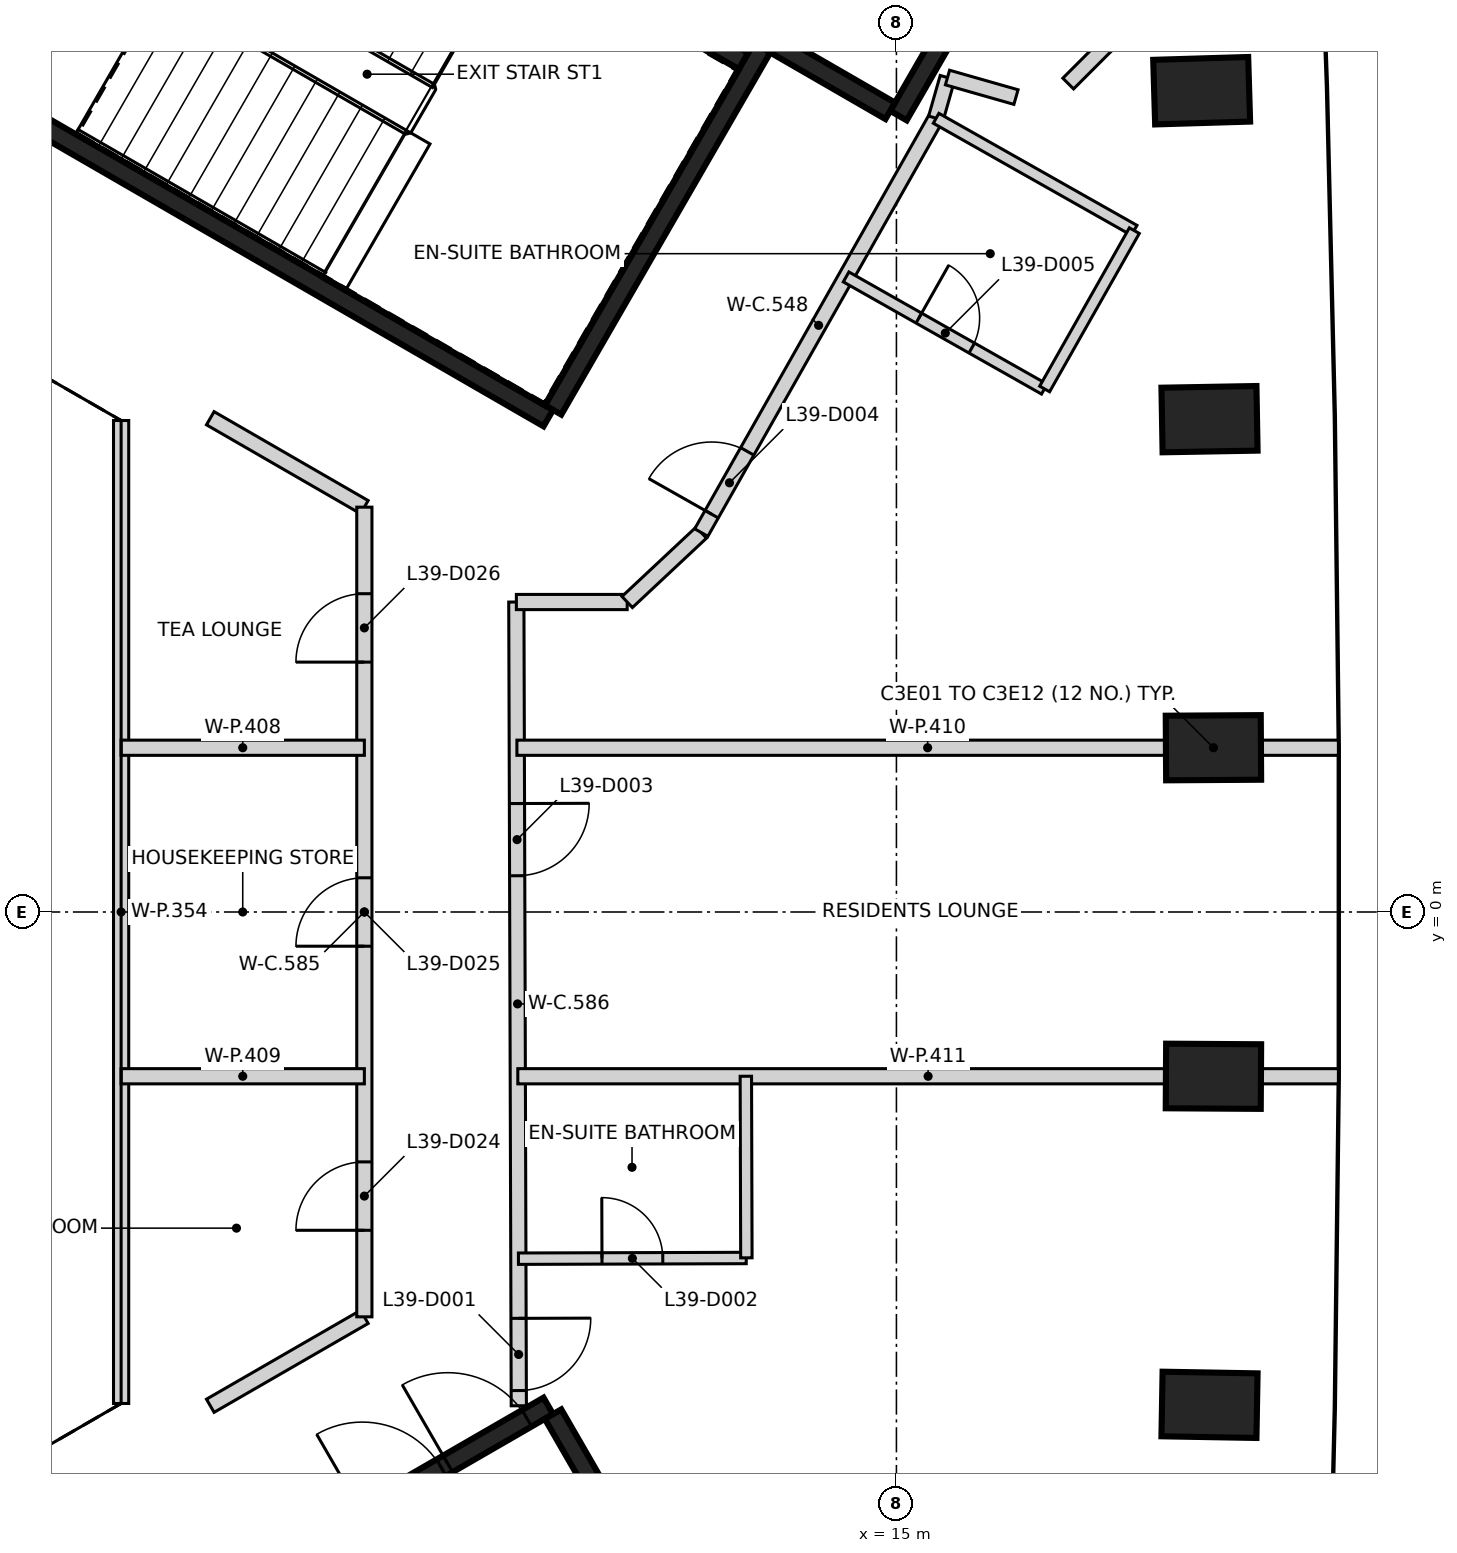
"""IFC4 building model, lengths in metres.
Left out: names, types, materials, properties, quantities, classifications, styles, units other than length and angle.
Written with IfcOpenShell. Run it as: python <this file> out.ifc"""

import sys

from ifc_helpers import new_model, si_unit, direction, frame, frame_2d, origin, origin_2d, place, context, subcontext, project, spatial, rectangle, extrude, element, fill, save


model = new_model("IFC4")
c1 = context("Model", 3, precision=1e-05, world=origin(), true_north=direction((0.0, 1.0)))
c2 = subcontext(c1, "Body", "Model", "MODEL_VIEW")
j1 = project(units=[si_unit("LENGTHUNIT", "METRE"), si_unit("PLANEANGLEUNIT", "RADIAN")], contexts=[c1])
p1 = place(None, origin())
s1 = spatial("IfcSite", under=j1, at=p1, CompositionType="ELEMENT")
p2 = place(p1, origin())
s2 = spatial("IfcBuilding", under=s1, at=p2, CompositionType="ELEMENT")
p3 = place(p2, frame((0.0, 0.0, 157.6)))
s3 = spatial("IfcBuildingStorey", under=s2, at=p3, CompositionType="ELEMENT", Elevation=157.6)
for number, where, z_axis, x_axis in (
    (1, (19.119, -6.484, -0.4), (0.0, 0.0, 1.0), (-1.0, 0.018, 0.0)),
    (2, (19.171, -2.161, -0.4), (0.0, 0.0, 1.0), (-1.0, 0.006, 0.0)),
    (3, (19.171, 2.161, -0.4), (0.0, 0.0, 1.0), (1.0, 0.006, 0.0)),
    (4, (19.119, 6.484, -0.4), (0.0, 0.0, 1.0), (1.0, 0.018, 0.0)),
    (5, (19.016, 10.805, -0.4), (0.0, 0.0, 1.0), (1.0, 0.03, 0.0)),
):
    element("IfcColumn", number, at=place(p3, frame(where, z_axis=z_axis, x_axis=x_axis)), inside=s3, PredefinedType="COLUMN", context=c2, shape_type="SweptSolid", body=[
        extrude(rectangle(XDim=1.25, YDim=0.85, at=origin_2d()), origin(), (0.0, 0.0, 1.0), 3.6),
    ])
p4 = place(p3, frame((10.42, 6.498, 0.0), z_axis=(0.0, 0.0, 1.0), x_axis=(-0.866021906294, 0.500006057782, 0.0)))
e6 = element("IfcWall", 6, at=p4, inside=s3, PredefinedType="SHEAR", context=c2, shape_type="SweptSolid", body=[
    extrude(rectangle(XDim=11.55, YDim=0.25, at=frame_2d((5.775, 0.0))), origin(), (0.0, 0.0, 1.0), 3.2),
])
p5 = place(p4, frame((10.025, 0.0, 0.0)))
e7 = element("IfcOpeningElement", 7, at=p5, cuts=e6, PredefinedType="OPENING", context=c2, shape_type="SweptSolid", body=[
    extrude(rectangle(XDim=1.2, YDim=2.1, at=frame_2d((0.6, 1.05))), frame((0.0, 0.135, 0.0), z_axis=(0.0, -1.0, 0.0), x_axis=(1.0, 0.0, 0.0)), (0.0, 0.0, 1.0), 0.27),
])
p6 = place(p4, frame((8.725, 0.0, 0.0)))
e8 = element("IfcOpeningElement", 8, at=p6, cuts=e6, PredefinedType="OPENING", context=c2, shape_type="SweptSolid", body=[
    extrude(rectangle(XDim=1.2, YDim=2.1, at=frame_2d((0.6, 1.05))), frame((0.0, 0.135, 0.0), z_axis=(0.0, -1.0, 0.0), x_axis=(1.0, 0.0, 0.0)), (0.0, 0.0, 1.0), 0.27),
])
p7 = place(p3, frame((13.238, 11.378, 0.0), z_axis=(0.0, 0.0, 1.0), x_axis=(-0.500008851346, -0.866020293397, 0.0)))
e9 = element("IfcWall", 9, at=p7, inside=s3, PredefinedType="SHEAR", context=c2, shape_type="SweptSolid", body=[
    extrude(rectangle(XDim=5.51, YDim=0.25, at=frame_2d((2.755, 0.0))), origin(), (0.0, 0.0, 1.0), 3.2),
])
p8 = place(p3, frame((16.552, 13.119, 0.0), z_axis=(0.0, 0.0, 1.0), x_axis=(-0.499978833458, -0.866037623948, 0.0)))
e10 = element("IfcWall", 10, at=p8, inside=s3, PredefinedType="SHEAR", context=c2, shape_type="SweptSolid", body=[
    extrude(rectangle(XDim=3.05, YDim=0.25, at=frame_2d((1.525, 0.0))), origin(), (0.0, 0.0, 1.0), 3.2),
])
p9 = place(p3, frame((14.918, 10.54, 0.0), z_axis=(0.0, 0.0, 1.0), x_axis=(-0.866063538972, 0.499933942099, 0.0)))
e11 = element("IfcWall", 11, at=p9, inside=s3, PredefinedType="SHEAR", context=c2, shape_type="SweptSolid", body=[
    extrude(rectangle(XDim=2.865, YDim=0.25, at=frame_2d((1.432, 0.0))), origin(), (0.0, 0.0, 1.0), 3.2),
])
p10 = place(p3, frame((10.865, 12.418, 0.0), z_axis=(0.0, 0.0, 1.0), x_axis=(0.866026229868, -0.499998569178, 0.0)))
e12 = element("IfcWall", 12, at=p10, inside=s3, PredefinedType="SHEAR", context=c2, shape_type="SweptSolid", body=[
    extrude(rectangle(XDim=2.449, YDim=0.25, at=frame_2d((1.225, 0.0))), origin(), (0.0, 0.0, 1.0), 3.2),
])
p11 = place(p3, frame((3.057, 10.895, 0.0), z_axis=(0.0, 0.0, 1.0), x_axis=(0.499989418164, 0.866031513124, 0.0)))
e13 = element("IfcWall", 13, at=p11, inside=s3, PredefinedType="SHEAR", context=c2, shape_type="SweptSolid", body=[
    extrude(rectangle(XDim=5.251, YDim=0.2, at=frame_2d((2.625, 0.0))), origin(), (0.0, 0.0, 1.0), 3.2),
])
p12 = place(p11, frame((1.849, 0.0, 0.0)))
e14 = element("IfcOpeningElement", 14, at=p12, cuts=e13, PredefinedType="OPENING", context=c2, shape_type="SweptSolid", body=[
    extrude(rectangle(XDim=1.4, YDim=2.1, at=frame_2d((0.7, 1.05))), frame((0.0, 0.11, 0.0), z_axis=(0.0, -1.0, 0.0), x_axis=(1.0, 0.0, 0.0)), (0.0, 0.0, 1.0), 0.22),
])
p13 = place(p3, frame((0.417, -12.273, 0.0), z_axis=(0.0, 0.0, 1.0), x_axis=(0.866021906294, 0.500006057782, 0.0)))
e15 = element("IfcWall", 15, at=p13, inside=s3, PredefinedType="SHEAR", context=c2, shape_type="SweptSolid", body=[
    extrude(rectangle(XDim=11.55, YDim=0.25, at=frame_2d((5.775, 0.0))), origin(), (0.0, 0.0, 1.0), 3.2),
])
p14 = place(p13, frame((10.025, 0.0, 0.0)))
e16 = element("IfcOpeningElement", 16, at=p14, cuts=e15, PredefinedType="OPENING", context=c2, shape_type="SweptSolid", body=[
    extrude(rectangle(XDim=1.2, YDim=2.1, at=frame_2d((0.6, 1.05))), frame((0.0, 0.135, 0.0), z_axis=(0.0, -1.0, 0.0), x_axis=(1.0, 0.0, 0.0)), (0.0, 0.0, 1.0), 0.27),
])
p15 = place(p13, frame((8.725, 0.0, 0.0)))
e17 = element("IfcOpeningElement", 17, at=p15, cuts=e15, PredefinedType="OPENING", context=c2, shape_type="SweptSolid", body=[
    extrude(rectangle(XDim=1.2, YDim=2.1, at=frame_2d((0.6, 1.05))), frame((0.0, 0.135, 0.0), z_axis=(0.0, -1.0, 0.0), x_axis=(1.0, 0.0, 0.0)), (0.0, 0.0, 1.0), 0.27),
])
p16 = place(p3, frame((10.483, -6.606, 0.0), z_axis=(0.0, 0.0, 1.0), x_axis=(0.49999885962, -0.866026062182, 0.0)))
e18 = element("IfcWall", 18, at=p16, inside=s3, PredefinedType="SHEAR", context=c2, shape_type="SweptSolid", body=[
    extrude(rectangle(XDim=5.225, YDim=0.25, at=frame_2d((2.612, 0.0))), origin(), (0.0, 0.0, 1.0), 3.2),
])
for number, where, z_axis, x_axis in (
    (19, (5.973, -6.496, 0.0), (0.0, 0.0, 1.0), (0.866, 0.5, 0.0)),
    (20, (5.973, 6.496, 0.0), (0.0, 0.0, 1.0), (0.866, -0.5, 0.0)),
):
    element("IfcWall", number, at=place(p3, frame(where, z_axis=z_axis, x_axis=x_axis)), inside=s3, PredefinedType="PARTITIONING", context=c2, shape_type="SweptSolid", body=[
        extrude(rectangle(XDim=2.341, YDim=0.2, at=frame_2d((1.17, 0.0))), origin(), (0.0, 0.0, 1.0), 3.2),
    ])
p17 = place(p3, frame((8.0, -5.326, 0.0), z_axis=(0.0, 0.0, 1.0), x_axis=(0.0, 1.0, 0.0)))
e21 = element("IfcWall", 21, at=p17, inside=s3, PredefinedType="PARTITIONING", context=c2, shape_type="SweptSolid", body=[
    extrude(rectangle(XDim=10.652, YDim=0.2, at=frame_2d((5.326, 0.0))), origin(), (0.0, 0.0, 1.0), 3.2),
])
p18 = place(p17, frame((1.138, 0.0, 0.0)))
e22 = element("IfcOpeningElement", 22, at=p18, cuts=e21, PredefinedType="OPENING", context=c2, shape_type="SweptSolid", body=[
    extrude(rectangle(XDim=0.9, YDim=2.1, at=frame_2d((0.45, 1.05))), frame((0.0, 0.11, 0.0), z_axis=(0.0, -1.0, 0.0), x_axis=(1.0, 0.0, 0.0)), (0.0, 0.0, 1.0), 0.22),
])
p19 = place(p17, frame((4.876, 0.0, 0.0)))
e23 = element("IfcOpeningElement", 23, at=p19, cuts=e21, PredefinedType="OPENING", context=c2, shape_type="SweptSolid", body=[
    extrude(rectangle(XDim=0.9, YDim=2.1, at=frame_2d((0.45, 1.05))), frame((0.0, 0.11, 0.0), z_axis=(0.0, -1.0, 0.0), x_axis=(1.0, 0.0, 0.0)), (0.0, 0.0, 1.0), 0.22),
])
p20 = place(p17, frame((8.614, 0.0, 0.0)))
e24 = element("IfcOpeningElement", 24, at=p20, cuts=e21, PredefinedType="OPENING", context=c2, shape_type="SweptSolid", body=[
    extrude(rectangle(XDim=0.9, YDim=2.1, at=frame_2d((0.45, 1.05))), frame((0.0, 0.11, 0.0), z_axis=(0.0, -1.0, 0.0), x_axis=(1.0, 0.0, 0.0)), (0.0, 0.0, 1.0), 0.22),
])
p21 = place(p3, frame((10.0, 4.078, 0.0), z_axis=(0.0, 0.0, 1.0), x_axis=(0.003070798941, -0.999995285086, 0.0)))
e25 = element("IfcWall", 25, at=p21, inside=s3, PredefinedType="PARTITIONING", context=c2, shape_type="SweptSolid", body=[
    extrude(rectangle(XDim=10.574, YDim=0.2, at=frame_2d((5.287, 0.0))), origin(), (0.0, 0.0, 1.0), 3.2),
])
p22 = place(p21, frame((9.424, 0.0, 0.0)))
e26 = element("IfcOpeningElement", 26, at=p22, cuts=e25, PredefinedType="OPENING", context=c2, shape_type="SweptSolid", body=[
    extrude(rectangle(XDim=0.95, YDim=2.1, at=frame_2d((0.475, 1.05))), frame((0.0, 0.11, 0.0), z_axis=(0.0, -1.0, 0.0), x_axis=(1.0, 0.0, 0.0)), (0.0, 0.0, 1.0), 0.22),
])
p23 = place(p21, frame((2.651, 0.0, 0.0)))
e27 = element("IfcOpeningElement", 27, at=p23, cuts=e25, PredefinedType="OPENING", context=c2, shape_type="SweptSolid", body=[
    extrude(rectangle(XDim=0.95, YDim=2.1, at=frame_2d((0.475, 1.05))), frame((0.0, 0.11, 0.0), z_axis=(0.0, -1.0, 0.0), x_axis=(1.0, 0.0, 0.0)), (0.0, 0.0, 1.0), 0.22),
])
p24 = place(p3, frame((10.0, 4.078, 0.0), z_axis=(0.0, 0.0, 1.0), x_axis=(1.0, 0.0, 0.0)))
e28 = element("IfcWall", 28, at=p24, inside=s3, PredefinedType="PARTITIONING", context=c2, shape_type="SweptSolid", body=[
    extrude(rectangle(XDim=1.458, YDim=0.2, at=frame_2d((0.729, 0.0))), origin(), (0.0, 0.0, 1.0), 3.2),
])
p25 = place(p3, frame((11.458, 4.078, 0.0), z_axis=(0.0, 0.0, 1.0), x_axis=(0.729936032318, 0.683515463412, 0.0)))
e29 = element("IfcWall", 29, at=p25, inside=s3, PredefinedType="PARTITIONING", context=c2, shape_type="SweptSolid", body=[
    extrude(rectangle(XDim=1.336, YDim=0.2, at=frame_2d((0.668, 0.0))), origin(), (0.0, 0.0, 1.0), 3.2),
])
p26 = place(p3, frame((12.433, 4.992, 0.0), z_axis=(0.0, 0.0, 1.0), x_axis=(0.492618265192, 0.870245508348, 0.0)))
e30 = element("IfcWall", 30, at=p26, inside=s3, PredefinedType="PARTITIONING", context=c2, shape_type="SweptSolid", body=[
    extrude(rectangle(XDim=6.265, YDim=0.2, at=frame_2d((3.133, 0.0))), origin(), (0.0, 0.0, 1.0), 3.2),
])
p27 = place(p26, frame((0.277, 0.0, 0.0)))
e31 = element("IfcOpeningElement", 31, at=p27, cuts=e30, PredefinedType="OPENING", context=c2, shape_type="SweptSolid", body=[
    extrude(rectangle(XDim=0.95, YDim=2.1, at=frame_2d((0.475, 1.05))), frame((0.0, 0.11, 0.0), z_axis=(0.0, -1.0, 0.0), x_axis=(1.0, 0.0, 0.0)), (0.0, 0.0, 1.0), 0.22),
])
p28 = place(p3, frame((15.52, 10.444, 0.0), z_axis=(0.0, 0.0, 1.0), x_axis=(0.273965995931, 0.961739378976, 0.0)))
e32 = element("IfcWall", 32, at=p28, inside=s3, PredefinedType="PARTITIONING", context=c2, shape_type="SweptSolid", body=[
    extrude(rectangle(XDim=0.555, YDim=0.2, at=frame_2d((0.278, 0.0))), origin(), (0.0, 0.0, 1.0), 3.2),
])
p29 = place(p3, frame((15.672, 10.978, 0.0), z_axis=(0.0, 0.0, 1.0), x_axis=(0.961612403256, -0.274411344344, 0.0)))
e33 = element("IfcWall", 33, at=p29, inside=s3, PredefinedType="PARTITIONING", context=c2, shape_type="SweptSolid", body=[
    extrude(rectangle(XDim=0.937, YDim=0.2, at=frame_2d((0.468, 0.0))), origin(), (0.0, 0.0, 1.0), 3.2),
])
p30 = place(p3, frame((17.26, 10.899, 0.0), z_axis=(0.0, 0.0, 1.0), x_axis=(0.707106781187, 0.707106781187, 0.0)))
e34 = element("IfcWall", 34, at=p30, inside=s3, PredefinedType="PARTITIONING", context=c2, shape_type="SweptSolid", body=[
    extrude(rectangle(XDim=1.768, YDim=0.2, at=frame_2d((0.884, 0.0))), origin(), (0.0, 0.0, 1.0), 3.2),
])
p31 = place(p3, frame((4.8, -6.466, 0.0), z_axis=(0.0, 0.0, 1.0), x_axis=(0.0, 1.0, 0.0)))
e35 = element("IfcWall", 35, at=p31, inside=s3, PredefinedType="PARTITIONING", context=c2, shape_type="SweptSolid", body=[
    extrude(rectangle(XDim=12.932, YDim=0.2, at=frame_2d((6.466, 0.0))), origin(), (0.0, 0.0, 1.0), 2.3),
])
p32 = place(p3, frame((4.8, 2.161, 0.0), z_axis=(0.0, 0.0, 1.0), x_axis=(1.0, 0.0, 0.0)))
e36 = element("IfcWall", 36, at=p32, inside=s3, PredefinedType="PARTITIONING", context=c2, shape_type="SweptSolid", body=[
    extrude(rectangle(XDim=3.2, YDim=0.2, at=frame_2d((1.6, 0.0))), origin(), (0.0, 0.0, 1.0), 2.3),
])
p33 = place(p3, frame((4.8, -2.161, 0.0), z_axis=(0.0, 0.0, 1.0), x_axis=(1.0, 0.0, 0.0)))
e37 = element("IfcWall", 37, at=p33, inside=s3, PredefinedType="PARTITIONING", context=c2, shape_type="SweptSolid", body=[
    extrude(rectangle(XDim=3.2, YDim=0.2, at=frame_2d((1.6, 0.0))), origin(), (0.0, 0.0, 1.0), 3.2),
])
p34 = place(p3, frame((10.007, 2.161, 0.0), z_axis=(0.0, 0.0, 1.0), x_axis=(1.0, 0.0, 0.0)))
e38 = element("IfcWall", 38, at=p34, inside=s3, PredefinedType="PARTITIONING", context=c2, shape_type="SweptSolid", body=[
    extrude(rectangle(XDim=10.808, YDim=0.2, at=frame_2d((5.404, 0.0))), origin(), (0.0, 0.0, 1.0), 3.2),
])
p35 = place(p3, frame((10.019, -2.161, 0.0), z_axis=(0.0, 0.0, 1.0), x_axis=(1.0, 0.0, 0.0)))
e39 = element("IfcWall", 39, at=p35, inside=s3, PredefinedType="PARTITIONING", context=c2, shape_type="SweptSolid", body=[
    extrude(rectangle(XDim=10.796, YDim=0.2, at=frame_2d((5.398, 0.0))), origin(), (0.0, 0.0, 1.0), 3.2),
])
p36 = place(p3, frame((10.027, -4.561, 0.0), z_axis=(0.0, 0.0, 1.0), x_axis=(0.999995457159, 0.003014242926, 0.0)))
e40 = element("IfcWall", 40, at=p36, inside=s3, PredefinedType="PARTITIONING", context=c2, shape_type="SweptSolid", body=[
    extrude(rectangle(XDim=2.997, YDim=0.15, at=frame_2d((1.499, 0.0))), origin(), (0.0, 0.0, 1.0), 3.2),
])
p37 = place(p36, frame((1.099, 0.0, 0.0)))
e41 = element("IfcOpeningElement", 41, at=p37, cuts=e40, PredefinedType="OPENING", context=c2, shape_type="SweptSolid", body=[
    extrude(rectangle(XDim=0.8, YDim=2.1, at=frame_2d((0.4, 1.05))), frame((0.0, 0.085, 0.0), z_axis=(0.0, -1.0, 0.0), x_axis=(1.0, 0.0, 0.0)), (0.0, 0.0, 1.0), 0.17),
])
p38 = place(p3, frame((13.019, -2.161, 0.0), z_axis=(0.0, 0.0, 1.0), x_axis=(0.002861218617, -0.999995906706, 0.0)))
e42 = element("IfcWall", 42, at=p38, inside=s3, PredefinedType="PARTITIONING", context=c2, shape_type="SweptSolid", body=[
    extrude(rectangle(XDim=2.389, YDim=0.15, at=frame_2d((1.195, 0.0))), origin(), (0.0, 0.0, 1.0), 3.2),
])
p39 = place(p3, frame((14.338, 8.355, 0.0), z_axis=(0.0, 0.0, 1.0), x_axis=(0.870291117047, -0.49253768545, 0.0)))
e43 = element("IfcWall", 43, at=p39, inside=s3, PredefinedType="PARTITIONING", context=c2, shape_type="SweptSolid", body=[
    extrude(rectangle(XDim=2.997, YDim=0.15, at=frame_2d((1.499, 0.0))), origin(), (0.0, 0.0, 1.0), 3.2),
])
p40 = place(p39, frame((1.1, 0.0, 0.0)))
e44 = element("IfcOpeningElement", 44, at=p40, cuts=e43, PredefinedType="OPENING", context=c2, shape_type="SweptSolid", body=[
    extrude(rectangle(XDim=0.8, YDim=2.1, at=frame_2d((0.4, 1.05))), frame((0.0, 0.085, 0.0), z_axis=(0.0, -1.0, 0.0), x_axis=(1.0, 0.0, 0.0)), (0.0, 0.0, 1.0), 0.17),
])
p41 = place(p3, frame((15.522, 10.442, 0.0), z_axis=(0.0, 0.0, 1.0), x_axis=(0.870427634909, -0.492296386729, 0.0)))
e45 = element("IfcWall", 45, at=p41, inside=s3, PredefinedType="PARTITIONING", context=c2, shape_type="SweptSolid", body=[
    extrude(rectangle(XDim=2.994, YDim=0.15, at=frame_2d((1.497, 0.0))), origin(), (0.0, 0.0, 1.0), 3.2),
])
p42 = place(p3, frame((16.95, 6.881, 0.0), z_axis=(0.0, 0.0, 1.0), x_axis=(0.49287361781, 0.870100911887, 0.0)))
e46 = element("IfcWall", 46, at=p42, inside=s3, PredefinedType="PARTITIONING", context=c2, shape_type="SweptSolid", body=[
    extrude(rectangle(XDim=2.394, YDim=0.15, at=frame_2d((1.197, 0.0))), origin(), (0.0, 0.0, 1.0), 3.2),
])
p43 = place(p14, origin())
e47 = element("IfcDoor", 47, at=p43, inside=s3, OperationType="SINGLE_SWING_LEFT", PredefinedType="DOOR", context=c2, shape_type="SweptSolid", body=[
    extrude(rectangle(XDim=1.2, YDim=2.1, at=frame_2d((0.6, 1.05))), frame((0.0, 0.025, 0.0), z_axis=(0.0, -1.0, 0.0), x_axis=(1.0, 0.0, 0.0)), (0.0, 0.0, 1.0), 0.05),
])
fill(e16, e47)
p44 = place(p15, origin())
e48 = element("IfcDoor", 48, at=p44, inside=s3, OperationType="SINGLE_SWING_RIGHT", PredefinedType="DOOR", context=c2, shape_type="SweptSolid", body=[
    extrude(rectangle(XDim=1.2, YDim=2.1, at=frame_2d((0.6, 1.05))), frame((0.0, 0.025, 0.0), z_axis=(0.0, -1.0, 0.0), x_axis=(1.0, 0.0, 0.0)), (0.0, 0.0, 1.0), 0.05),
])
fill(e17, e48)
p45 = place(p22, origin())
e49 = element("IfcDoor", 49, at=p45, inside=s3, OperationType="SINGLE_SWING_LEFT", PredefinedType="DOOR", context=c2, shape_type="SweptSolid", body=[
    extrude(rectangle(XDim=0.95, YDim=2.1, at=frame_2d((0.475, 1.05))), frame((0.0, 0.025, 0.0), z_axis=(0.0, -1.0, 0.0), x_axis=(1.0, 0.0, 0.0)), (0.0, 0.0, 1.0), 0.05),
])
fill(e26, e49)
p46 = place(p37, frame((0.8, 0.0, 0.0), z_axis=(0.0, 0.0, 1.0), x_axis=(-1.0, 0.0, 0.0)))
e50 = element("IfcDoor", 50, at=p46, inside=s3, OperationType="SINGLE_SWING_LEFT", PredefinedType="DOOR", context=c2, shape_type="SweptSolid", body=[
    extrude(rectangle(XDim=0.8, YDim=2.1, at=frame_2d((0.4, 1.05))), frame((0.0, 0.025, 0.0), z_axis=(0.0, -1.0, 0.0), x_axis=(1.0, 0.0, 0.0)), (0.0, 0.0, 1.0), 0.05),
])
fill(e41, e50)
p47 = place(p23, origin())
e51 = element("IfcDoor", 51, at=p47, inside=s3, OperationType="SINGLE_SWING_LEFT", PredefinedType="DOOR", context=c2, shape_type="SweptSolid", body=[
    extrude(rectangle(XDim=0.95, YDim=2.1, at=frame_2d((0.475, 1.05))), frame((0.0, 0.025, 0.0), z_axis=(0.0, -1.0, 0.0), x_axis=(1.0, 0.0, 0.0)), (0.0, 0.0, 1.0), 0.05),
])
fill(e27, e51)
p48 = place(p27, origin())
e52 = element("IfcDoor", 52, at=p48, inside=s3, OperationType="SINGLE_SWING_LEFT", PredefinedType="DOOR", context=c2, shape_type="SweptSolid", body=[
    extrude(rectangle(XDim=0.95, YDim=2.1, at=frame_2d((0.475, 1.05))), frame((0.0, 0.025, 0.0), z_axis=(0.0, -1.0, 0.0), x_axis=(1.0, 0.0, 0.0)), (0.0, 0.0, 1.0), 0.05),
])
fill(e31, e52)
p49 = place(p40, origin())
e53 = element("IfcDoor", 53, at=p49, inside=s3, OperationType="SINGLE_SWING_LEFT", PredefinedType="DOOR", context=c2, shape_type="SweptSolid", body=[
    extrude(rectangle(XDim=0.8, YDim=2.1, at=frame_2d((0.4, 1.05))), frame((0.0, 0.025, 0.0), z_axis=(0.0, -1.0, 0.0), x_axis=(1.0, 0.0, 0.0)), (0.0, 0.0, 1.0), 0.05),
])
fill(e44, e53)
p50 = place(p18, origin())
e54 = element("IfcDoor", 54, at=p50, inside=s3, OperationType="SINGLE_SWING_LEFT", PredefinedType="DOOR", context=c2, shape_type="SweptSolid", body=[
    extrude(rectangle(XDim=0.9, YDim=2.1, at=frame_2d((0.45, 1.05))), frame((0.0, 0.025, 0.0), z_axis=(0.0, -1.0, 0.0), x_axis=(1.0, 0.0, 0.0)), (0.0, 0.0, 1.0), 0.05),
])
fill(e22, e54)
p51 = place(p19, origin())
e55 = element("IfcDoor", 55, at=p51, inside=s3, OperationType="SINGLE_SWING_LEFT", PredefinedType="DOOR", context=c2, shape_type="SweptSolid", body=[
    extrude(rectangle(XDim=0.9, YDim=2.1, at=frame_2d((0.45, 1.05))), frame((0.0, 0.025, 0.0), z_axis=(0.0, -1.0, 0.0), x_axis=(1.0, 0.0, 0.0)), (0.0, 0.0, 1.0), 0.05),
])
fill(e23, e55)
p52 = place(p20, origin())
e56 = element("IfcDoor", 56, at=p52, inside=s3, OperationType="SINGLE_SWING_LEFT", PredefinedType="DOOR", context=c2, shape_type="SweptSolid", body=[
    extrude(rectangle(XDim=0.9, YDim=2.1, at=frame_2d((0.45, 1.05))), frame((0.0, 0.025, 0.0), z_axis=(0.0, -1.0, 0.0), x_axis=(1.0, 0.0, 0.0)), (0.0, 0.0, 1.0), 0.05),
])
fill(e24, e56)
save(model, sys.argv[1])
